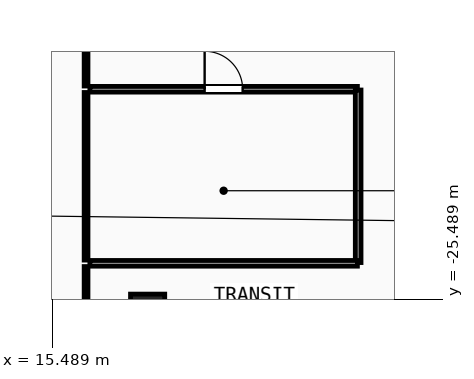
"""IFC4 building model, lengths in metres.
Left out: names, types, materials, properties, quantities, classifications, styles, units other than length and angle.
Written with IfcOpenShell. Run it as: python <this file> out.ifc"""

import sys

from ifc_helpers import new_model, si_unit, direction, frame, frame_2d, origin, origin_2d, place, context, subcontext, project, spatial, rectangle, extrude, element, fill, save


model = new_model("IFC4")
c1 = context("Model", 3, precision=1e-05, world=origin(), true_north=direction((0.0, 1.0)))
c2 = subcontext(c1, "Body", "Model", "MODEL_VIEW")
j1 = project(units=[si_unit("LENGTHUNIT", "METRE"), si_unit("PLANEANGLEUNIT", "RADIAN")], contexts=[c1])
p1 = place(None, origin())
s1 = spatial("IfcSite", under=j1, at=p1, CompositionType="ELEMENT")
p2 = place(p1, origin())
s2 = spatial("IfcBuilding", under=s1, at=p2, CompositionType="ELEMENT")
p3 = place(p2, origin())
s3 = spatial("IfcBuildingStorey", under=s2, at=p3, CompositionType="ELEMENT", Elevation=0.0)
p4 = place(p3, frame((18.0, -25.8, 0.0), z_axis=(0.0, 0.0, 1.0), x_axis=(1.0, 0.0, 0.0)))
e1 = element("IfcColumn", 1, at=p4, inside=s3, PredefinedType="COLUMN", context=c2, shape_type="SweptSolid", body=[
    extrude(rectangle(XDim=0.9, YDim=0.9, at=origin_2d()), origin(), (0.0, 0.0, 1.0), 5.65),
])
p5 = place(p3, frame((16.48, -19.96, 0.0), z_axis=(0.0, 0.0, 1.0), x_axis=(1.0, 0.0, 0.0)))
e2 = element("IfcWall", 2, at=p5, inside=s3, PredefinedType="PARTITIONING", context=c2, shape_type="SweptSolid", body=[
    extrude(rectangle(XDim=7.04, YDim=0.15, at=frame_2d((3.52, 0.0))), origin(), (0.0, 0.0, 1.0), 5.65),
])
p6 = place(p5, frame((3.02, 0.0, 0.0)))
e3 = element("IfcOpeningElement", 3, at=p6, cuts=e2, PredefinedType="OPENING", context=c2, shape_type="SweptSolid", body=[
    extrude(rectangle(XDim=1.0, YDim=2.15, at=frame_2d((0.5, 1.075))), frame((0.0, 0.085, 0.0), z_axis=(0.0, -1.0, 0.0), x_axis=(1.0, 0.0, 0.0)), (0.0, 0.0, 1.0), 0.17),
])
p7 = place(p3, frame((23.54, -24.52, 0.0), z_axis=(0.0, 0.0, 1.0), x_axis=(0.0, 1.0, 0.0)))
e4 = element("IfcWall", 4, at=p7, inside=s3, PredefinedType="PARTITIONING", context=c2, shape_type="SweptSolid", body=[
    extrude(rectangle(XDim=4.54, YDim=0.15, at=frame_2d((2.27, 0.0))), origin(), (0.0, 0.0, 1.0), 5.65),
])
p8 = place(p3, frame((16.48, -24.54, 0.0), z_axis=(0.0, 0.0, 1.0), x_axis=(1.0, 0.0, 0.0)))
e5 = element("IfcWall", 5, at=p8, inside=s3, PredefinedType="PARTITIONING", context=c2, shape_type="SweptSolid", body=[
    extrude(rectangle(XDim=7.04, YDim=0.15, at=frame_2d((3.52, 0.0))), origin(), (0.0, 0.0, 1.0), 5.65),
])
p9 = place(p3, frame((16.38, -28.745, 0.0), z_axis=(0.0, 0.0, 1.0), x_axis=(0.0, 1.0, 0.0)))
e6 = element("IfcWall", 6, at=p9, inside=s3, PredefinedType="PARTITIONING", context=c2, shape_type="SweptSolid", body=[
    extrude(rectangle(XDim=4.12, YDim=0.1, at=frame_2d((2.06, 0.0))), origin(), (0.0, 0.0, 1.0), 5.65),
])
p10 = place(p3, frame((16.38, -24.455, 0.0), z_axis=(0.0, 0.0, 1.0), x_axis=(0.0, 1.0, 0.0)))
e7 = element("IfcWall", 7, at=p10, inside=s3, PredefinedType="PARTITIONING", context=c2, shape_type="SweptSolid", body=[
    extrude(rectangle(XDim=4.41, YDim=0.1, at=frame_2d((2.205, 0.0))), origin(), (0.0, 0.0, 1.0), 5.65),
])
p11 = place(p3, frame((16.38, -19.875, 0.0), z_axis=(0.0, 0.0, 1.0), x_axis=(0.0, 1.0, 0.0)))
e8 = element("IfcWall", 8, at=p11, inside=s3, PredefinedType="PARTITIONING", context=c2, shape_type="SweptSolid", body=[
    extrude(rectangle(XDim=17.745, YDim=0.1, at=frame_2d((8.873, 0.0))), origin(), (0.0, 0.0, 1.0), 4.877),
])
p12 = place(p6, origin())
e9 = element("IfcDoor", 9, at=p12, inside=s3, OperationType="SINGLE_SWING_LEFT", PredefinedType="DOOR", context=c2, shape_type="SweptSolid", body=[
    extrude(rectangle(XDim=1.0, YDim=2.15, at=frame_2d((0.5, 1.075))), frame((0.0, 0.025, 0.0), z_axis=(0.0, -1.0, 0.0), x_axis=(1.0, 0.0, 0.0)), (0.0, 0.0, 1.0), 0.05),
])
fill(e3, e9)
save(model, sys.argv[1])
